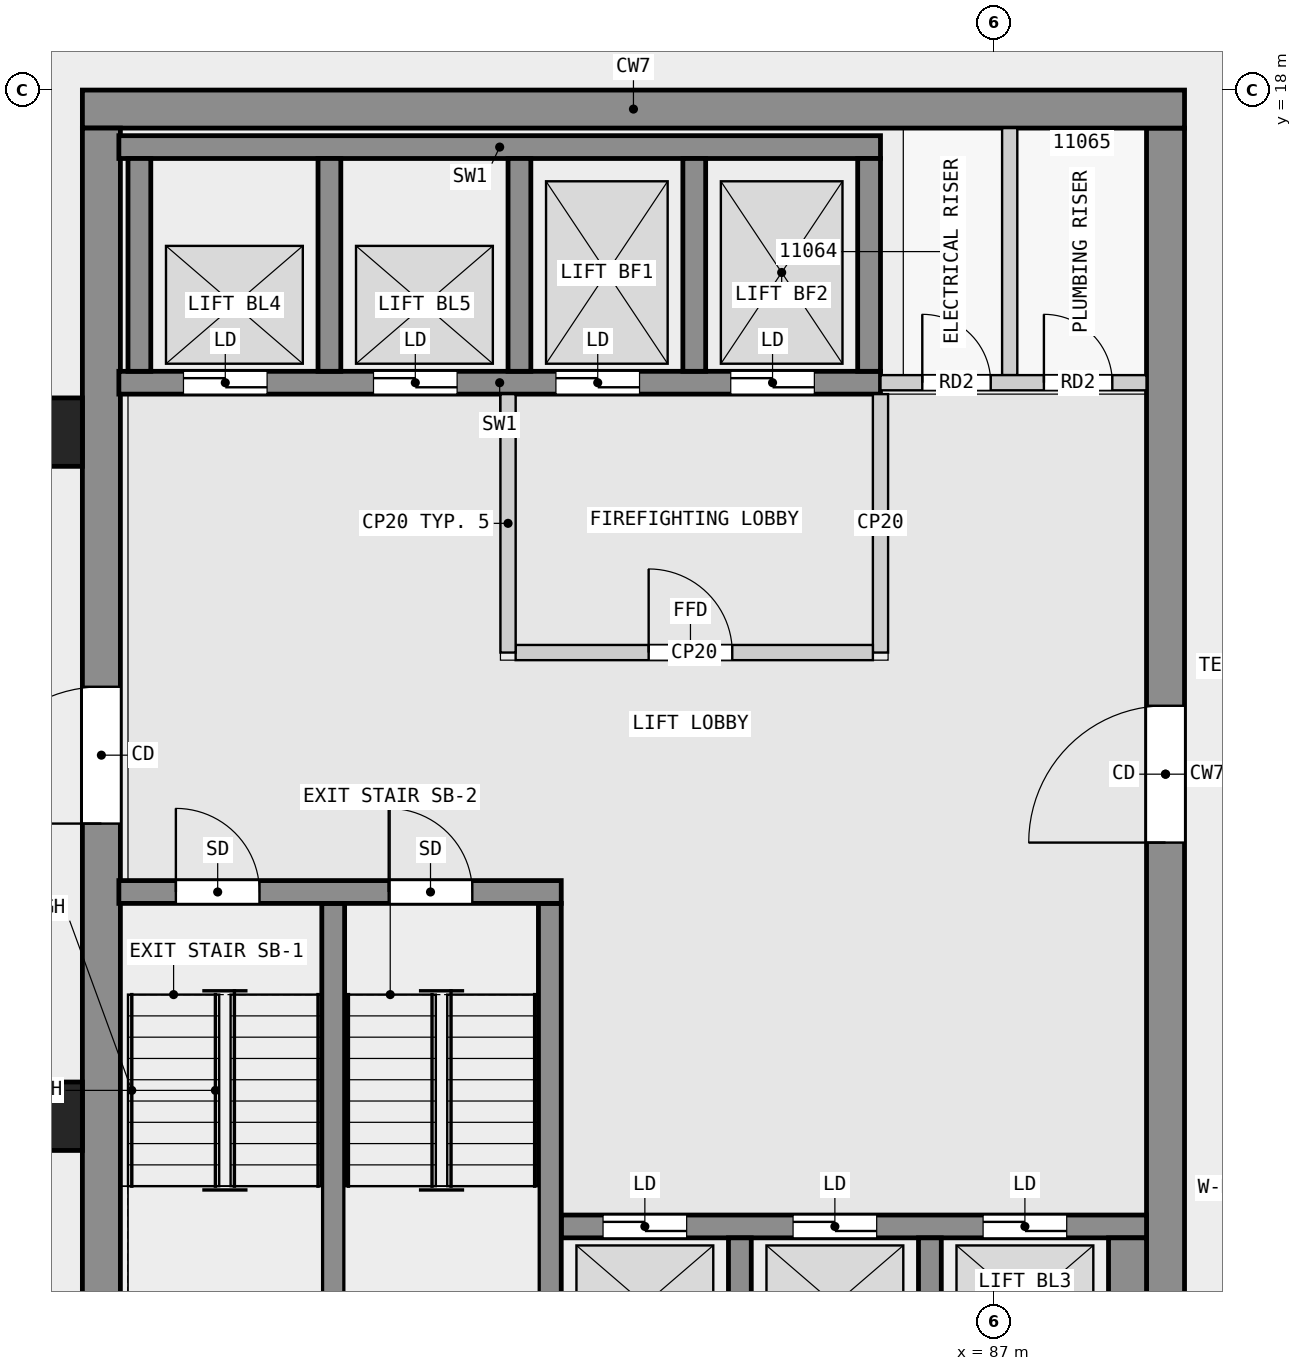
"""IFC4 building model, lengths in metres.
Left out: names, types, materials, properties, quantities, classifications, styles, units other than length and angle.
Written with IfcOpenShell. Run it as: python <this file> out.ifc"""

import sys

from ifc_helpers import new_model, si_unit, direction, frame, frame_2d, origin, origin_2d, place, context, subcontext, project, spatial, rectangle, extrude, element, fill, save


model = new_model("IFC4")
c1 = context("Model", 3, precision=1e-05, world=origin(), true_north=direction((0.0, 1.0)))
c2 = subcontext(c1, "Body", "Model", "MODEL_VIEW")
j1 = project(units=[si_unit("LENGTHUNIT", "METRE"), si_unit("PLANEANGLEUNIT", "RADIAN")], contexts=[c1])
p1 = place(None, origin())
s1 = spatial("IfcSite", under=j1, at=p1, CompositionType="ELEMENT")
p2 = place(p1, origin())
s2 = spatial("IfcBuilding", under=s1, at=p2, CompositionType="ELEMENT")
p3 = place(p2, frame((0.0, 0.0, 47.8)))
s3 = spatial("IfcBuildingStorey", under=s2, at=p3, CompositionType="ELEMENT", Elevation=47.8)
for number, where, z_axis, x_axis in (
    (1, (74.55, 13.5, 0.0), (0.0, 0.0, 1.0), (1.0, 0.0, 0.0)),
    (2, (74.55, 4.5, 0.0), (0.0, 0.0, 1.0), (1.0, 0.0, 0.0)),
):
    element("IfcColumn", number, at=place(p3, frame(where, z_axis=z_axis, x_axis=x_axis)), inside=s3, PredefinedType="COLUMN", context=c2, shape_type="SweptSolid", body=[
        extrude(rectangle(XDim=0.9, YDim=0.9, at=origin_2d()), origin(), (0.0, 0.0, 1.0), 3.5),
    ])
p4 = place(p3, frame((75.0, 17.75, 0.0), z_axis=(0.0, 0.0, 1.0), x_axis=(1.0, 0.0, 0.0)))
e3 = element("IfcWall", 3, at=p4, inside=s3, PredefinedType="SHEAR", context=c2, shape_type="SweptSolid", body=[
    extrude(rectangle(XDim=14.5, YDim=0.5, at=frame_2d((7.25, 0.0))), origin(), (0.0, 0.0, 1.0), 3.25),
])
p5 = place(p3, frame((75.25, 0.5, 0.0), z_axis=(0.0, 0.0, 1.0), x_axis=(0.0, 1.0, 0.0)))
e4 = element("IfcWall", 4, at=p5, inside=s3, PredefinedType="SHEAR", context=c2, shape_type="SweptSolid", body=[
    extrude(rectangle(XDim=17.0, YDim=0.5, at=frame_2d((8.5, 0.0))), origin(), (0.0, 0.0, 1.0), 3.25),
])
p6 = place(p5, frame((7.85, 0.0, 0.0)))
e5 = element("IfcOpeningElement", 5, at=p6, cuts=e4, PredefinedType="OPENING", context=c2, shape_type="SweptSolid", body=[
    extrude(rectangle(XDim=1.8, YDim=2.1, at=frame_2d((0.9, 1.05))), frame((0.0, 0.26, 0.0), z_axis=(0.0, -1.0, 0.0), x_axis=(1.0, 0.0, 0.0)), (0.0, 0.0, 1.0), 0.52),
])
p7 = place(p3, frame((89.25, 0.5, 0.0), z_axis=(0.0, 0.0, 1.0), x_axis=(0.0, 1.0, 0.0)))
e6 = element("IfcWall", 6, at=p7, inside=s3, PredefinedType="SHEAR", context=c2, shape_type="SweptSolid", body=[
    extrude(rectangle(XDim=17.0, YDim=0.5, at=frame_2d((8.5, 0.0))), origin(), (0.0, 0.0, 1.0), 3.25),
])
p8 = place(p7, frame((7.6, 0.0, 0.0)))
e7 = element("IfcOpeningElement", 7, at=p8, cuts=e6, PredefinedType="OPENING", context=c2, shape_type="SweptSolid", body=[
    extrude(rectangle(XDim=1.8, YDim=2.1, at=frame_2d((0.9, 1.05))), frame((0.0, 0.26, 0.0), z_axis=(0.0, -1.0, 0.0), x_axis=(1.0, 0.0, 0.0)), (0.0, 0.0, 1.0), 0.52),
])
p9 = place(p3, frame((75.48, 7.45, 0.0), z_axis=(0.0, 0.0, 1.0), x_axis=(1.0, 0.0, 0.0)))
e8 = element("IfcWall", 8, at=p9, inside=s3, PredefinedType="SHEAR", context=c2, shape_type="SweptSolid", body=[
    extrude(rectangle(XDim=5.82, YDim=0.3, at=frame_2d((2.91, 0.0))), origin(), (0.0, 0.0, 1.0), 3.25),
])
p10 = place(p9, frame((0.75, 0.0, 0.0)))
e9 = element("IfcOpeningElement", 9, at=p10, cuts=e8, PredefinedType="OPENING", context=c2, shape_type="SweptSolid", body=[
    extrude(rectangle(XDim=1.1, YDim=2.1, at=frame_2d((0.55, 1.05))), frame((0.0, 0.16, 0.0), z_axis=(0.0, -1.0, 0.0), x_axis=(1.0, 0.0, 0.0)), (0.0, 0.0, 1.0), 0.32),
])
p11 = place(p9, frame((3.55, 0.0, 0.0)))
e10 = element("IfcOpeningElement", 10, at=p11, cuts=e8, PredefinedType="OPENING", context=c2, shape_type="SweptSolid", body=[
    extrude(rectangle(XDim=1.1, YDim=2.1, at=frame_2d((0.55, 1.05))), frame((0.0, 0.16, 0.0), z_axis=(0.0, -1.0, 0.0), x_axis=(1.0, 0.0, 0.0)), (0.0, 0.0, 1.0), 0.32),
])
for number, where, z_axis, x_axis in (
    (11, (78.3, 0.9, 0.0), (0.0, 0.0, 1.0), (0.0, 1.0, 0.0)),
    (12, (81.15, 0.9, 0.0), (0.0, 0.0, 1.0), (0.0, 1.0, 0.0)),
):
    element("IfcWall", number, at=place(p3, frame(where, z_axis=z_axis, x_axis=x_axis)), inside=s3, PredefinedType="SHEAR", context=c2, shape_type="SweptSolid", body=[
        extrude(rectangle(XDim=6.4, YDim=0.3, at=frame_2d((3.2, 0.0))), origin(), (0.0, 0.0, 1.0), 3.25),
    ])
for number, where, z_axis, x_axis in (
    (13, (83.65, 0.9, 0.0), (0.0, 0.0, 1.0), (0.0, 1.0, 0.0)),
    (14, (86.15, 0.9, 0.0), (0.0, 0.0, 1.0), (0.0, 1.0, 0.0)),
):
    element("IfcWall", number, at=place(p3, frame(where, z_axis=z_axis, x_axis=x_axis)), inside=s3, PredefinedType="SHEAR", context=c2, shape_type="SweptSolid", body=[
        extrude(rectangle(XDim=2.0, YDim=0.3, at=frame_2d((1.0, 0.0))), origin(), (0.0, 0.0, 1.0), 3.25),
    ])
p12 = place(p3, frame((88.75, 0.9, 0.0), z_axis=(0.0, 0.0, 1.0), x_axis=(0.0, 1.0, 0.0)))
e15 = element("IfcWall", 15, at=p12, inside=s3, PredefinedType="SHEAR", context=c2, shape_type="SweptSolid", body=[
    extrude(rectangle(XDim=2.0, YDim=0.5, at=frame_2d((1.0, 0.0))), origin(), (0.0, 0.0, 1.0), 3.25),
])
p13 = place(p3, frame((81.3, 3.05, 0.0), z_axis=(0.0, 0.0, 1.0), x_axis=(1.0, 0.0, 0.0)))
e16 = element("IfcWall", 16, at=p13, inside=s3, PredefinedType="SHEAR", context=c2, shape_type="SweptSolid", body=[
    extrude(rectangle(XDim=7.7, YDim=0.3, at=frame_2d((3.85, 0.0))), origin(), (0.0, 0.0, 1.0), 3.25),
])
p14 = place(p13, frame((0.55, 0.0, 0.0)))
e17 = element("IfcOpeningElement", 17, at=p14, cuts=e16, PredefinedType="OPENING", context=c2, shape_type="SweptSolid", body=[
    extrude(rectangle(XDim=1.1, YDim=2.1, at=frame_2d((0.55, 1.05))), frame((0.0, 0.16, 0.0), z_axis=(0.0, -1.0, 0.0), x_axis=(1.0, 0.0, 0.0)), (0.0, 0.0, 1.0), 0.32),
])
p15 = place(p13, frame((3.05, 0.0, 0.0)))
e18 = element("IfcOpeningElement", 18, at=p15, cuts=e16, PredefinedType="OPENING", context=c2, shape_type="SweptSolid", body=[
    extrude(rectangle(XDim=1.1, YDim=2.1, at=frame_2d((0.55, 1.05))), frame((0.0, 0.16, 0.0), z_axis=(0.0, -1.0, 0.0), x_axis=(1.0, 0.0, 0.0)), (0.0, 0.0, 1.0), 0.32),
])
p16 = place(p13, frame((5.55, 0.0, 0.0)))
e19 = element("IfcOpeningElement", 19, at=p16, cuts=e16, PredefinedType="OPENING", context=c2, shape_type="SweptSolid", body=[
    extrude(rectangle(XDim=1.1, YDim=2.1, at=frame_2d((0.55, 1.05))), frame((0.0, 0.16, 0.0), z_axis=(0.0, -1.0, 0.0), x_axis=(1.0, 0.0, 0.0)), (0.0, 0.0, 1.0), 0.32),
])
p17 = place(p3, frame((75.48, 17.25, 0.0), z_axis=(0.0, 0.0, 1.0), x_axis=(1.0, 0.0, 0.0)))
e20 = element("IfcWall", 20, at=p17, inside=s3, PredefinedType="SHEAR", context=c2, shape_type="SweptSolid", body=[
    extrude(rectangle(XDim=10.02, YDim=0.3, at=frame_2d((5.01, 0.0))), origin(), (0.0, 0.0, 1.0), 3.25),
])
p18 = place(p3, frame((75.48, 14.15, 0.0), z_axis=(0.0, 0.0, 1.0), x_axis=(1.0, 0.0, 0.0)))
e21 = element("IfcWall", 21, at=p18, inside=s3, PredefinedType="SHEAR", context=c2, shape_type="SweptSolid", body=[
    extrude(rectangle(XDim=10.02, YDim=0.3, at=frame_2d((5.01, 0.0))), origin(), (0.0, 0.0, 1.0), 3.25),
])
p19 = place(p18, frame((0.85, 0.0, 0.0)))
e22 = element("IfcOpeningElement", 22, at=p19, cuts=e21, PredefinedType="OPENING", context=c2, shape_type="SweptSolid", body=[
    extrude(rectangle(XDim=1.1, YDim=2.1, at=frame_2d((0.55, 1.05))), frame((0.0, 0.16, 0.0), z_axis=(0.0, -1.0, 0.0), x_axis=(1.0, 0.0, 0.0)), (0.0, 0.0, 1.0), 0.32),
])
p20 = place(p18, frame((3.35, 0.0, 0.0)))
e23 = element("IfcOpeningElement", 23, at=p20, cuts=e21, PredefinedType="OPENING", context=c2, shape_type="SweptSolid", body=[
    extrude(rectangle(XDim=1.1, YDim=2.1, at=frame_2d((0.55, 1.05))), frame((0.0, 0.16, 0.0), z_axis=(0.0, -1.0, 0.0), x_axis=(1.0, 0.0, 0.0)), (0.0, 0.0, 1.0), 0.32),
])
p21 = place(p18, frame((5.75, 0.0, 0.0)))
e24 = element("IfcOpeningElement", 24, at=p21, cuts=e21, PredefinedType="OPENING", context=c2, shape_type="SweptSolid", body=[
    extrude(rectangle(XDim=1.1, YDim=2.1, at=frame_2d((0.55, 1.05))), frame((0.0, 0.16, 0.0), z_axis=(0.0, -1.0, 0.0), x_axis=(1.0, 0.0, 0.0)), (0.0, 0.0, 1.0), 0.32),
])
p22 = place(p18, frame((8.05, 0.0, 0.0)))
e25 = element("IfcOpeningElement", 25, at=p22, cuts=e21, PredefinedType="OPENING", context=c2, shape_type="SweptSolid", body=[
    extrude(rectangle(XDim=1.1, YDim=2.1, at=frame_2d((0.55, 1.05))), frame((0.0, 0.16, 0.0), z_axis=(0.0, -1.0, 0.0), x_axis=(1.0, 0.0, 0.0)), (0.0, 0.0, 1.0), 0.32),
])
for number, where, z_axis, x_axis in (
    (26, (75.75, 14.3, 0.0), (0.0, 0.0, 1.0), (0.0, 1.0, 0.0)),
    (27, (78.25, 14.3, 0.0), (0.0, 0.0, 1.0), (0.0, 1.0, 0.0)),
    (28, (80.75, 14.3, 0.0), (0.0, 0.0, 1.0), (0.0, 1.0, 0.0)),
    (29, (83.05, 14.3, 0.0), (0.0, 0.0, 1.0), (0.0, 1.0, 0.0)),
    (30, (85.35, 14.3, 0.0), (0.0, 0.0, 1.0), (0.0, 1.0, 0.0)),
):
    element("IfcWall", number, at=place(p3, frame(where, z_axis=z_axis, x_axis=x_axis)), inside=s3, PredefinedType="SHEAR", context=c2, shape_type="SweptSolid", body=[
        extrude(rectangle(XDim=2.8, YDim=0.3, at=frame_2d((1.4, 0.0))), origin(), (0.0, 0.0, 1.0), 3.25),
    ])
p23 = place(p3, frame((80.6, 10.6, 0.0), z_axis=(0.0, 0.0, 1.0), x_axis=(0.0, 1.0, 0.0)))
e31 = element("IfcWall", 31, at=p23, inside=s3, PredefinedType="PARTITIONING", context=c2, shape_type="SweptSolid", body=[
    extrude(rectangle(XDim=3.4, YDim=0.2, at=frame_2d((1.7, 0.0))), origin(), (0.0, 0.0, 1.0), 3.25),
])
p24 = place(p3, frame((80.7, 10.6, 0.0), z_axis=(0.0, 0.0, 1.0), x_axis=(1.0, 0.0, 0.0)))
e32 = element("IfcWall", 32, at=p24, inside=s3, PredefinedType="PARTITIONING", context=c2, shape_type="SweptSolid", body=[
    extrude(rectangle(XDim=4.7, YDim=0.2, at=frame_2d((2.35, 0.0))), origin(), (0.0, 0.0, 1.0), 3.25),
])
p25 = place(p24, frame((1.75, 0.0, 0.0)))
e33 = element("IfcOpeningElement", 33, at=p25, cuts=e32, PredefinedType="OPENING", context=c2, shape_type="SweptSolid", body=[
    extrude(rectangle(XDim=1.1, YDim=2.1, at=frame_2d((0.55, 1.05))), frame((0.0, 0.11, 0.0), z_axis=(0.0, -1.0, 0.0), x_axis=(1.0, 0.0, 0.0)), (0.0, 0.0, 1.0), 0.22),
])
p26 = place(p3, frame((85.5, 10.6, 0.0), z_axis=(0.0, 0.0, 1.0), x_axis=(0.0, 1.0, 0.0)))
e34 = element("IfcWall", 34, at=p26, inside=s3, PredefinedType="PARTITIONING", context=c2, shape_type="SweptSolid", body=[
    extrude(rectangle(XDim=3.4, YDim=0.2, at=frame_2d((1.7, 0.0))), origin(), (0.0, 0.0, 1.0), 3.25),
])
p27 = place(p3, frame((85.5, 14.15, 0.0), z_axis=(0.0, 0.0, 1.0), x_axis=(1.0, 0.0, 0.0)))
e35 = element("IfcWall", 35, at=p27, inside=s3, PredefinedType="PARTITIONING", context=c2, shape_type="SweptSolid", body=[
    extrude(rectangle(XDim=3.5, YDim=0.2, at=frame_2d((1.75, 0.0))), origin(), (0.0, 0.0, 1.0), 3.25),
])
p28 = place(p27, frame((0.55, 0.0, 0.0)))
e36 = element("IfcOpeningElement", 36, at=p28, cuts=e35, PredefinedType="OPENING", context=c2, shape_type="SweptSolid", body=[
    extrude(rectangle(XDim=0.9, YDim=2.1, at=frame_2d((0.45, 1.05))), frame((0.0, 0.11, 0.0), z_axis=(0.0, -1.0, 0.0), x_axis=(1.0, 0.0, 0.0)), (0.0, 0.0, 1.0), 0.22),
])
p29 = place(p27, frame((2.15, 0.0, 0.0)))
e37 = element("IfcOpeningElement", 37, at=p29, cuts=e35, PredefinedType="OPENING", context=c2, shape_type="SweptSolid", body=[
    extrude(rectangle(XDim=0.9, YDim=2.1, at=frame_2d((0.45, 1.05))), frame((0.0, 0.11, 0.0), z_axis=(0.0, -1.0, 0.0), x_axis=(1.0, 0.0, 0.0)), (0.0, 0.0, 1.0), 0.22),
])
p30 = place(p3, frame((87.2, 14.25, 0.0), z_axis=(0.0, 0.0, 1.0), x_axis=(0.0, 1.0, 0.0)))
e38 = element("IfcWall", 38, at=p30, inside=s3, PredefinedType="PARTITIONING", context=c2, shape_type="SweptSolid", body=[
    extrude(rectangle(XDim=3.25, YDim=0.2, at=frame_2d((1.625, 0.0))), origin(), (0.0, 0.0, 1.0), 3.25),
])
p31 = place(p25, origin())
e39 = element("IfcDoor", 39, at=p31, inside=s3, OperationType="SINGLE_SWING_LEFT", PredefinedType="DOOR", context=c2, shape_type="SweptSolid", body=[
    extrude(rectangle(XDim=1.1, YDim=2.1, at=frame_2d((0.55, 1.05))), frame((0.0, 0.025, 0.0), z_axis=(0.0, -1.0, 0.0), x_axis=(1.0, 0.0, 0.0)), (0.0, 0.0, 1.0), 0.05),
])
fill(e33, e39)
p32 = place(p14, origin())
e40 = element("IfcDoor", 40, at=p32, inside=s3, OperationType="DOUBLE_DOOR_SLIDING", PredefinedType="DOOR", context=c2, shape_type="SweptSolid", body=[
    extrude(rectangle(XDim=1.1, YDim=2.1, at=frame_2d((0.55, 1.05))), frame((0.0, 0.025, 0.0), z_axis=(0.0, -1.0, 0.0), x_axis=(1.0, 0.0, 0.0)), (0.0, 0.0, 1.0), 0.05),
])
fill(e17, e40)
p33 = place(p15, origin())
e41 = element("IfcDoor", 41, at=p33, inside=s3, OperationType="DOUBLE_DOOR_SLIDING", PredefinedType="DOOR", context=c2, shape_type="SweptSolid", body=[
    extrude(rectangle(XDim=1.1, YDim=2.1, at=frame_2d((0.55, 1.05))), frame((0.0, 0.025, 0.0), z_axis=(0.0, -1.0, 0.0), x_axis=(1.0, 0.0, 0.0)), (0.0, 0.0, 1.0), 0.05),
])
fill(e18, e41)
p34 = place(p16, origin())
e42 = element("IfcDoor", 42, at=p34, inside=s3, OperationType="DOUBLE_DOOR_SLIDING", PredefinedType="DOOR", context=c2, shape_type="SweptSolid", body=[
    extrude(rectangle(XDim=1.1, YDim=2.1, at=frame_2d((0.55, 1.05))), frame((0.0, 0.025, 0.0), z_axis=(0.0, -1.0, 0.0), x_axis=(1.0, 0.0, 0.0)), (0.0, 0.0, 1.0), 0.05),
])
fill(e19, e42)
p35 = place(p19, origin())
e43 = element("IfcDoor", 43, at=p35, inside=s3, OperationType="DOUBLE_DOOR_SLIDING", PredefinedType="DOOR", context=c2, shape_type="SweptSolid", body=[
    extrude(rectangle(XDim=1.1, YDim=2.1, at=frame_2d((0.55, 1.05))), frame((0.0, 0.025, 0.0), z_axis=(0.0, -1.0, 0.0), x_axis=(1.0, 0.0, 0.0)), (0.0, 0.0, 1.0), 0.05),
])
fill(e22, e43)
p36 = place(p20, origin())
e44 = element("IfcDoor", 44, at=p36, inside=s3, OperationType="DOUBLE_DOOR_SLIDING", PredefinedType="DOOR", context=c2, shape_type="SweptSolid", body=[
    extrude(rectangle(XDim=1.1, YDim=2.1, at=frame_2d((0.55, 1.05))), frame((0.0, 0.025, 0.0), z_axis=(0.0, -1.0, 0.0), x_axis=(1.0, 0.0, 0.0)), (0.0, 0.0, 1.0), 0.05),
])
fill(e23, e44)
p37 = place(p21, origin())
e45 = element("IfcDoor", 45, at=p37, inside=s3, OperationType="DOUBLE_DOOR_SLIDING", PredefinedType="DOOR", context=c2, shape_type="SweptSolid", body=[
    extrude(rectangle(XDim=1.1, YDim=2.1, at=frame_2d((0.55, 1.05))), frame((0.0, 0.025, 0.0), z_axis=(0.0, -1.0, 0.0), x_axis=(1.0, 0.0, 0.0)), (0.0, 0.0, 1.0), 0.05),
])
fill(e24, e45)
p38 = place(p22, origin())
e46 = element("IfcDoor", 46, at=p38, inside=s3, OperationType="DOUBLE_DOOR_SLIDING", PredefinedType="DOOR", context=c2, shape_type="SweptSolid", body=[
    extrude(rectangle(XDim=1.1, YDim=2.1, at=frame_2d((0.55, 1.05))), frame((0.0, 0.025, 0.0), z_axis=(0.0, -1.0, 0.0), x_axis=(1.0, 0.0, 0.0)), (0.0, 0.0, 1.0), 0.05),
])
fill(e25, e46)
p39 = place(p10, origin())
e47 = element("IfcDoor", 47, at=p39, inside=s3, OperationType="SINGLE_SWING_RIGHT", PredefinedType="DOOR", context=c2, shape_type="SweptSolid", body=[
    extrude(rectangle(XDim=1.1, YDim=2.1, at=frame_2d((0.55, 1.05))), frame((0.0, 0.025, 0.0), z_axis=(0.0, -1.0, 0.0), x_axis=(1.0, 0.0, 0.0)), (0.0, 0.0, 1.0), 0.05),
])
fill(e9, e47)
p40 = place(p11, origin())
e48 = element("IfcDoor", 48, at=p40, inside=s3, OperationType="SINGLE_SWING_LEFT", PredefinedType="DOOR", context=c2, shape_type="SweptSolid", body=[
    extrude(rectangle(XDim=1.1, YDim=2.1, at=frame_2d((0.55, 1.05))), frame((0.0, 0.025, 0.0), z_axis=(0.0, -1.0, 0.0), x_axis=(1.0, 0.0, 0.0)), (0.0, 0.0, 1.0), 0.05),
])
fill(e10, e48)
p41 = place(p6, origin())
e49 = element("IfcDoor", 49, at=p41, inside=s3, OperationType="DOUBLE_DOOR_SINGLE_SWING", PredefinedType="DOOR", context=c2, shape_type="SweptSolid", body=[
    extrude(rectangle(XDim=1.8, YDim=2.1, at=frame_2d((0.9, 1.05))), frame((0.0, 0.025, 0.0), z_axis=(0.0, -1.0, 0.0), x_axis=(1.0, 0.0, 0.0)), (0.0, 0.0, 1.0), 0.05),
])
fill(e5, e49)
p42 = place(p8, origin())
e50 = element("IfcDoor", 50, at=p42, inside=s3, OperationType="DOUBLE_DOOR_SINGLE_SWING", PredefinedType="DOOR", context=c2, shape_type="SweptSolid", body=[
    extrude(rectangle(XDim=1.8, YDim=2.1, at=frame_2d((0.9, 1.05))), frame((0.0, 0.025, 0.0), z_axis=(0.0, -1.0, 0.0), x_axis=(1.0, 0.0, 0.0)), (0.0, 0.0, 1.0), 0.05),
])
fill(e7, e50)
p43 = place(p28, origin())
e51 = element("IfcDoor", 51, at=p43, inside=s3, OperationType="SINGLE_SWING_LEFT", PredefinedType="DOOR", context=c2, shape_type="SweptSolid", body=[
    extrude(rectangle(XDim=0.9, YDim=2.1, at=frame_2d((0.45, 1.05))), frame((0.0, 0.025, 0.0), z_axis=(0.0, -1.0, 0.0), x_axis=(1.0, 0.0, 0.0)), (0.0, 0.0, 1.0), 0.05),
])
fill(e36, e51)
p44 = place(p29, origin())
e52 = element("IfcDoor", 52, at=p44, inside=s3, OperationType="SINGLE_SWING_LEFT", PredefinedType="DOOR", context=c2, shape_type="SweptSolid", body=[
    extrude(rectangle(XDim=0.9, YDim=2.1, at=frame_2d((0.45, 1.05))), frame((0.0, 0.025, 0.0), z_axis=(0.0, -1.0, 0.0), x_axis=(1.0, 0.0, 0.0)), (0.0, 0.0, 1.0), 0.05),
])
fill(e37, e52)
save(model, sys.argv[1])
